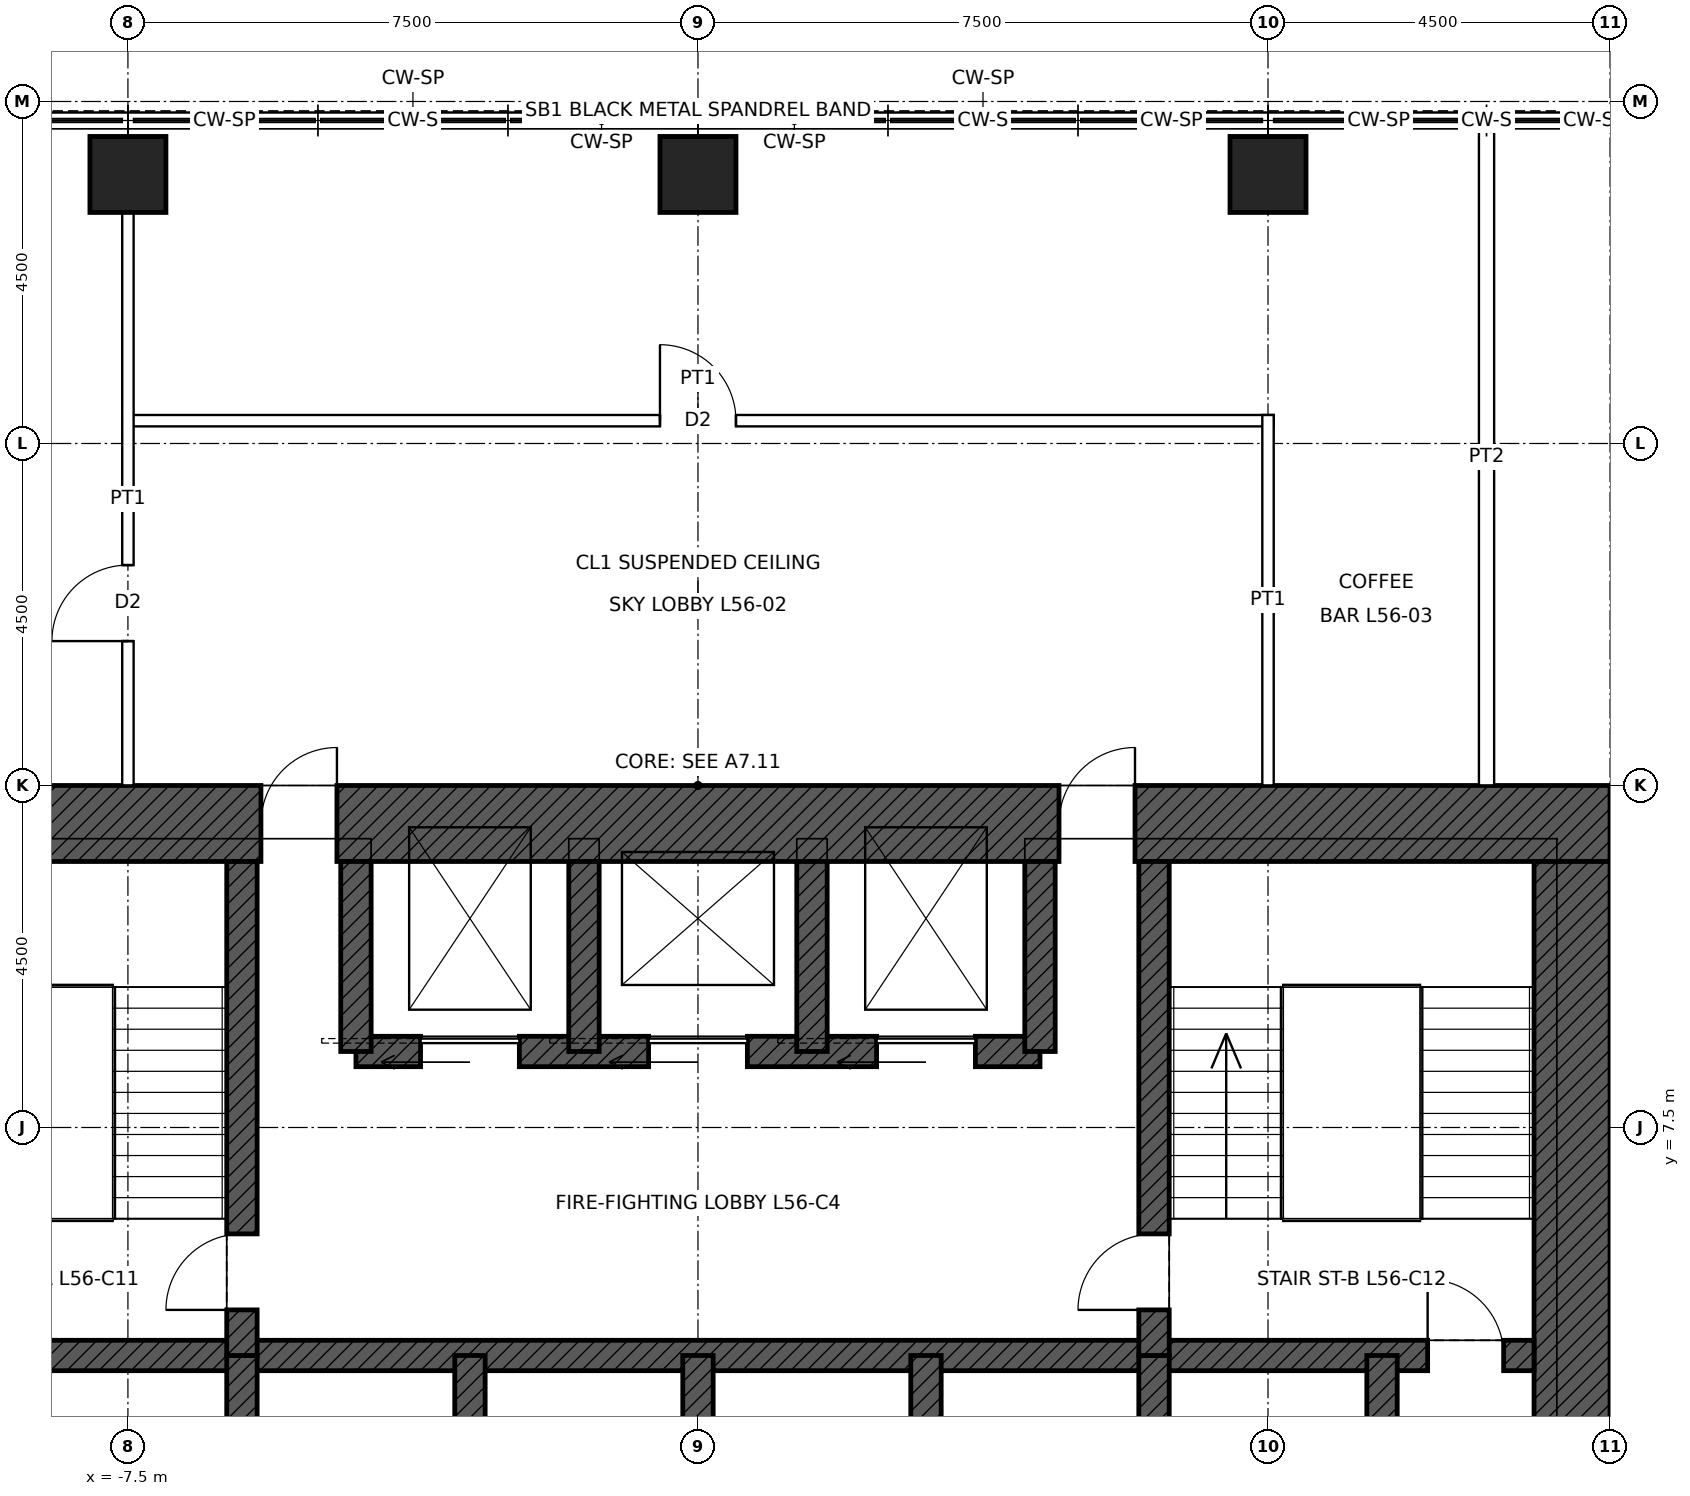
"""IFC4 building model, lengths in metres.
Left out: names, types, materials, properties, quantities, classifications, styles, units other than length and angle.
Written with IfcOpenShell. Run it as: python <this file> out.ifc"""

import sys

from ifc_helpers import new_model, si_unit, direction, frame, frame_2d, origin, origin_2d, place, context, subcontext, project, spatial, rectangle, hollow_rectangle, extrude, element, fill, save


model = new_model("IFC4")
c1 = context("Model", 3, precision=1e-05, world=origin(), true_north=direction((0.0, 1.0)))
c2 = subcontext(c1, "Body", "Model", "MODEL_VIEW")
j1 = project(units=[si_unit("LENGTHUNIT", "METRE"), si_unit("PLANEANGLEUNIT", "RADIAN")], contexts=[c1])
p1 = place(None, origin())
s1 = spatial("IfcSite", under=j1, at=p1, CompositionType="ELEMENT")
p2 = place(p1, origin())
s2 = spatial("IfcBuilding", under=s1, at=p2, CompositionType="ELEMENT")
p3 = place(p2, frame((0.0, 0.0, 259.9)))
s3 = spatial("IfcBuildingStorey", under=s2, at=p3, CompositionType="ELEMENT", Elevation=259.9)
for number, where, z_axis, x_axis in (
    (1, (-7.5, 20.04, 0.0), (0.0, 0.0, 1.0), (1.0, 0.0, 0.0)),
    (2, (0.0, 20.04, 0.0), (0.0, 0.0, 1.0), (1.0, 0.0, 0.0)),
    (3, (7.5, 20.04, 0.0), (0.0, 0.0, 1.0), (1.0, 0.0, 0.0)),
):
    element("IfcColumn", number, at=place(p3, frame(where, z_axis=z_axis, x_axis=x_axis)), inside=s3, PredefinedType="COLUMN", context=c2, shape_type="SweptSolid", body=[
        extrude(hollow_rectangle(XDim=1.0, YDim=1.0, WallThickness=0.075, at=origin_2d()), origin(), (0.0, 0.0, 1.0), 4.0),
    ])
p4 = place(p3, frame((-12.0, 11.5, 0.0), z_axis=(0.0, 0.0, 1.0), x_axis=(1.0, 0.0, 0.0)))
e4 = element("IfcWall", 4, at=p4, inside=s3, PredefinedType="SHEAR", context=c2, shape_type="SweptSolid", body=[
    extrude(rectangle(XDim=24.0, YDim=1.0, at=frame_2d((12.0, 0.0))), origin(), (0.0, 0.0, 1.0), 4.0),
])
p5 = place(p4, frame((6.25, 0.0, 0.0)))
e5 = element("IfcOpeningElement", 5, at=p5, cuts=e4, PredefinedType="OPENING", context=c2, shape_type="SweptSolid", body=[
    extrude(rectangle(XDim=1.0, YDim=2.4, at=frame_2d((0.5, 1.2))), frame((0.0, 0.51, 0.0), z_axis=(0.0, -1.0, 0.0), x_axis=(1.0, 0.0, 0.0)), (0.0, 0.0, 1.0), 1.02),
])
p6 = place(p4, frame((16.75, 0.0, 0.0)))
e6 = element("IfcOpeningElement", 6, at=p6, cuts=e4, PredefinedType="OPENING", context=c2, shape_type="SweptSolid", body=[
    extrude(rectangle(XDim=1.0, YDim=2.4, at=frame_2d((0.5, 1.2))), frame((0.0, 0.51, 0.0), z_axis=(0.0, -1.0, 0.0), x_axis=(1.0, 0.0, 0.0)), (0.0, 0.0, 1.0), 1.02),
])
p7 = place(p3, frame((11.5, 11.0, 0.0), z_axis=(0.0, 0.0, 1.0), x_axis=(0.0, -1.0, 0.0)))
e7 = element("IfcWall", 7, at=p7, inside=s3, PredefinedType="SHEAR", context=c2, shape_type="SweptSolid", body=[
    extrude(rectangle(XDim=22.0, YDim=1.0, at=frame_2d((11.0, 0.0))), origin(), (0.0, 0.0, 1.0), 4.0),
])
p8 = place(p7, frame((10.5, 0.0, 0.0)))
e8 = element("IfcOpeningElement", 8, at=p8, cuts=e7, PredefinedType="OPENING", context=c2, shape_type="SweptSolid", body=[
    extrude(rectangle(XDim=1.0, YDim=2.4, at=frame_2d((0.5, 1.2))), frame((0.0, 0.51, 0.0), z_axis=(0.0, -1.0, 0.0), x_axis=(1.0, 0.0, 0.0)), (0.0, 0.0, 1.0), 1.02),
])
p9 = place(p3, frame((-11.0, 4.5, 0.0), z_axis=(0.0, 0.0, 1.0), x_axis=(1.0, 0.0, 0.0)))
e9 = element("IfcWall", 9, at=p9, inside=s3, PredefinedType="SHEAR", context=c2, shape_type="SweptSolid", body=[
    extrude(rectangle(XDim=22.0, YDim=0.4, at=frame_2d((11.0, 0.0))), origin(), (0.0, 0.0, 1.0), 4.0),
])
p10 = place(p9, frame((0.4, 0.0, 0.0)))
e10 = element("IfcOpeningElement", 10, at=p10, cuts=e9, PredefinedType="OPENING", context=c2, shape_type="SweptSolid", body=[
    extrude(rectangle(XDim=1.0, YDim=2.1, at=frame_2d((0.5, 1.05))), frame((0.0, 0.21, 0.0), z_axis=(0.0, -1.0, 0.0), x_axis=(1.0, 0.0, 0.0)), (0.0, 0.0, 1.0), 0.42),
])
p11 = place(p9, frame((20.6, 0.0, 0.0)))
e11 = element("IfcOpeningElement", 11, at=p11, cuts=e9, PredefinedType="OPENING", context=c2, shape_type="SweptSolid", body=[
    extrude(rectangle(XDim=1.0, YDim=2.1, at=frame_2d((0.5, 1.05))), frame((0.0, 0.21, 0.0), z_axis=(0.0, -1.0, 0.0), x_axis=(1.0, 0.0, 0.0)), (0.0, 0.0, 1.0), 0.42),
])
p12 = place(p3, frame((-4.5, 8.5, 0.0), z_axis=(0.0, 0.0, 1.0), x_axis=(1.0, 0.0, 0.0)))
e12 = element("IfcWall", 12, at=p12, inside=s3, PredefinedType="SHEAR", context=c2, shape_type="SweptSolid", body=[
    extrude(rectangle(XDim=9.0, YDim=0.4, at=frame_2d((4.5, 0.0))), origin(), (0.0, 0.0, 1.0), 4.0),
])
p13 = place(p12, frame((0.85, 0.0, 0.0)))
e13 = element("IfcOpeningElement", 13, at=p13, cuts=e12, PredefinedType="OPENING", context=c2, shape_type="SweptSolid", body=[
    extrude(rectangle(XDim=1.3, YDim=2.4, at=frame_2d((0.65, 1.2))), frame((0.0, 0.21, 0.0), z_axis=(0.0, -1.0, 0.0), x_axis=(1.0, 0.0, 0.0)), (0.0, 0.0, 1.0), 0.42),
])
p14 = place(p12, frame((6.85, 0.0, 0.0)))
e14 = element("IfcOpeningElement", 14, at=p14, cuts=e12, PredefinedType="OPENING", context=c2, shape_type="SweptSolid", body=[
    extrude(rectangle(XDim=1.3, YDim=2.4, at=frame_2d((0.65, 1.2))), frame((0.0, 0.21, 0.0), z_axis=(0.0, -1.0, 0.0), x_axis=(1.0, 0.0, 0.0)), (0.0, 0.0, 1.0), 0.42),
])
p15 = place(p12, frame((3.85, 0.0, 0.0)))
e15 = element("IfcOpeningElement", 15, at=p15, cuts=e12, PredefinedType="OPENING", context=c2, shape_type="SweptSolid", body=[
    extrude(rectangle(XDim=1.3, YDim=2.4, at=frame_2d((0.65, 1.2))), frame((0.0, 0.21, 0.0), z_axis=(0.0, -1.0, 0.0), x_axis=(1.0, 0.0, 0.0)), (0.0, 0.0, 1.0), 0.42),
])
for number, where, z_axis, x_axis in (
    (16, (9.0, 1.5, 0.0), (0.0, 0.0, 1.0), (0.0, 1.0, 0.0)),
    (17, (-6.0, 1.5, 0.0), (0.0, 0.0, 1.0), (0.0, 1.0, 0.0)),
    (18, (-3.0, 1.5, 0.0), (0.0, 0.0, 1.0), (0.0, 1.0, 0.0)),
    (19, (0.0, 1.5, 0.0), (0.0, 0.0, 1.0), (0.0, 1.0, 0.0)),
    (20, (3.0, 1.5, 0.0), (0.0, 0.0, 1.0), (0.0, 1.0, 0.0)),
    (21, (6.0, 1.5, 0.0), (0.0, 0.0, 1.0), (0.0, 1.0, 0.0)),
):
    element("IfcWall", number, at=place(p3, frame(where, z_axis=z_axis, x_axis=x_axis)), inside=s3, PredefinedType="SHEAR", context=c2, shape_type="SweptSolid", body=[
        extrude(rectangle(XDim=3.0, YDim=0.4, at=frame_2d((1.5, 0.0))), origin(), (0.0, 0.0, 1.0), 4.0),
    ])
p16 = place(p3, frame((-6.0, 4.5, 0.0), z_axis=(0.0, 0.0, 1.0), x_axis=(0.0, 1.0, 0.0)))
e22 = element("IfcWall", 22, at=p16, inside=s3, PredefinedType="SHEAR", context=c2, shape_type="SweptSolid", body=[
    extrude(rectangle(XDim=6.5, YDim=0.4, at=frame_2d((3.25, 0.0))), origin(), (0.0, 0.0, 1.0), 4.0),
])
p17 = place(p16, frame((0.6, 0.0, 0.0)))
e23 = element("IfcOpeningElement", 23, at=p17, cuts=e22, PredefinedType="OPENING", context=c2, shape_type="SweptSolid", body=[
    extrude(rectangle(XDim=1.0, YDim=2.1, at=frame_2d((0.5, 1.05))), frame((0.0, 0.21, 0.0), z_axis=(0.0, -1.0, 0.0), x_axis=(1.0, 0.0, 0.0)), (0.0, 0.0, 1.0), 0.42),
])
p18 = place(p3, frame((6.0, 4.5, 0.0), z_axis=(0.0, 0.0, 1.0), x_axis=(0.0, 1.0, 0.0)))
e24 = element("IfcWall", 24, at=p18, inside=s3, PredefinedType="SHEAR", context=c2, shape_type="SweptSolid", body=[
    extrude(rectangle(XDim=6.5, YDim=0.4, at=frame_2d((3.25, 0.0))), origin(), (0.0, 0.0, 1.0), 4.0),
])
p19 = place(p18, frame((0.6, 0.0, 0.0)))
e25 = element("IfcOpeningElement", 25, at=p19, cuts=e24, PredefinedType="OPENING", context=c2, shape_type="SweptSolid", body=[
    extrude(rectangle(XDim=1.0, YDim=2.1, at=frame_2d((0.5, 1.05))), frame((0.0, 0.21, 0.0), z_axis=(0.0, -1.0, 0.0), x_axis=(1.0, 0.0, 0.0)), (0.0, 0.0, 1.0), 0.42),
])
for number, where, z_axis, x_axis in (
    (26, (-4.5, 8.5, 0.0), (0.0, 0.0, 1.0), (0.0, 1.0, 0.0)),
    (27, (4.5, 8.5, 0.0), (0.0, 0.0, 1.0), (0.0, 1.0, 0.0)),
    (28, (-1.5, 8.5, 0.0), (0.0, 0.0, 1.0), (0.0, 1.0, 0.0)),
    (29, (1.5, 8.5, 0.0), (0.0, 0.0, 1.0), (0.0, 1.0, 0.0)),
):
    element("IfcWall", number, at=place(p3, frame(where, z_axis=z_axis, x_axis=x_axis)), inside=s3, PredefinedType="SHEAR", context=c2, shape_type="SweptSolid", body=[
        extrude(rectangle(XDim=2.5, YDim=0.4, at=frame_2d((1.25, 0.0))), origin(), (0.0, 0.0, 1.0), 4.0),
    ])
p20 = place(p3, frame((-7.575, 16.8, 0.0), z_axis=(0.0, 0.0, 1.0), x_axis=(1.0, 0.0, 0.0)))
e30 = element("IfcWall", 30, at=p20, inside=s3, PredefinedType="PARTITIONING", context=c2, shape_type="SweptSolid", body=[
    extrude(rectangle(XDim=15.15, YDim=0.15, at=frame_2d((7.575, 0.0))), origin(), (0.0, 0.0, 1.0), 3.85),
])
p21 = place(p20, frame((7.075, 0.0, 0.0)))
e31 = element("IfcOpeningElement", 31, at=p21, cuts=e30, PredefinedType="OPENING", context=c2, shape_type="SweptSolid", body=[
    extrude(rectangle(XDim=1.0, YDim=2.1, at=frame_2d((0.5, 1.05))), frame((0.0, 0.085, 0.0), z_axis=(0.0, -1.0, 0.0), x_axis=(1.0, 0.0, 0.0)), (0.0, 0.0, 1.0), 0.17),
])
p22 = place(p3, frame((-7.5, 12.0, 0.0), z_axis=(0.0, 0.0, 1.0), x_axis=(0.0, 1.0, 0.0)))
e32 = element("IfcWall", 32, at=p22, inside=s3, PredefinedType="PARTITIONING", context=c2, shape_type="SweptSolid", body=[
    extrude(rectangle(XDim=7.54, YDim=0.15, at=frame_2d((3.77, 0.0))), origin(), (0.0, 0.0, 1.0), 3.243),
])
p23 = place(p22, frame((1.9, 0.0, 0.0)))
e33 = element("IfcOpeningElement", 33, at=p23, cuts=e32, PredefinedType="OPENING", context=c2, shape_type="SweptSolid", body=[
    extrude(rectangle(XDim=1.0, YDim=2.1, at=frame_2d((0.5, 1.05))), frame((0.0, 0.085, 0.0), z_axis=(0.0, -1.0, 0.0), x_axis=(1.0, 0.0, 0.0)), (0.0, 0.0, 1.0), 0.17),
])
p24 = place(p3, frame((7.5, 12.0, 0.0), z_axis=(0.0, 0.0, 1.0), x_axis=(0.0, 1.0, 0.0)))
e34 = element("IfcWall", 34, at=p24, inside=s3, PredefinedType="PARTITIONING", context=c2, shape_type="SweptSolid", body=[
    extrude(rectangle(XDim=4.875, YDim=0.15, at=frame_2d((2.438, 0.0))), origin(), (0.0, 0.0, 1.0), 3.243),
])
p25 = place(p3, frame((10.375, 12.0, 0.0), z_axis=(0.0, 0.0, 1.0), x_axis=(0.0, 1.0, 0.0)))
e35 = element("IfcWall", 35, at=p25, inside=s3, PredefinedType="PARTITIONING", context=c2, shape_type="SweptSolid", body=[
    extrude(rectangle(XDim=8.65, YDim=0.2, at=frame_2d((4.325, 0.0))), origin(), (0.0, 0.0, 1.0), 3.85),
])
p26 = place(p11, origin())
e36 = element("IfcDoor", 36, at=p26, inside=s3, OperationType="SINGLE_SWING_LEFT", PredefinedType="DOOR", context=c2, shape_type="SweptSolid", body=[
    extrude(rectangle(XDim=1.0, YDim=2.1, at=frame_2d((0.5, 1.05))), frame((0.0, 0.025, 0.0), z_axis=(0.0, -1.0, 0.0), x_axis=(1.0, 0.0, 0.0)), (0.0, 0.0, 1.0), 0.05),
])
fill(e11, e36)
p27 = place(p17, origin())
e37 = element("IfcDoor", 37, at=p27, inside=s3, OperationType="SINGLE_SWING_LEFT", PredefinedType="DOOR", context=c2, shape_type="SweptSolid", body=[
    extrude(rectangle(XDim=1.0, YDim=2.1, at=frame_2d((0.5, 1.05))), frame((0.0, 0.025, 0.0), z_axis=(0.0, -1.0, 0.0), x_axis=(1.0, 0.0, 0.0)), (0.0, 0.0, 1.0), 0.05),
])
fill(e23, e37)
p28 = place(p19, origin())
e38 = element("IfcDoor", 38, at=p28, inside=s3, OperationType="SINGLE_SWING_LEFT", PredefinedType="DOOR", context=c2, shape_type="SweptSolid", body=[
    extrude(rectangle(XDim=1.0, YDim=2.1, at=frame_2d((0.5, 1.05))), frame((0.0, 0.025, 0.0), z_axis=(0.0, -1.0, 0.0), x_axis=(1.0, 0.0, 0.0)), (0.0, 0.0, 1.0), 0.05),
])
fill(e25, e38)
p29 = place(p5, origin())
e39 = element("IfcDoor", 39, at=p29, inside=s3, OperationType="SINGLE_SWING_RIGHT", PredefinedType="DOOR", context=c2, shape_type="SweptSolid", body=[
    extrude(rectangle(XDim=1.0, YDim=2.4, at=frame_2d((0.5, 1.2))), frame((0.0, 0.485, 0.0), z_axis=(0.0, -1.0, 0.0), x_axis=(1.0, 0.0, 0.0)), (0.0, 0.0, 1.0), 0.05),
])
fill(e5, e39)
p30 = place(p6, origin())
e40 = element("IfcDoor", 40, at=p30, inside=s3, OperationType="SINGLE_SWING_RIGHT", PredefinedType="DOOR", context=c2, shape_type="SweptSolid", body=[
    extrude(rectangle(XDim=1.0, YDim=2.4, at=frame_2d((0.5, 1.2))), frame((0.0, 0.485, 0.0), z_axis=(0.0, -1.0, 0.0), x_axis=(1.0, 0.0, 0.0)), (0.0, 0.0, 1.0), 0.05),
])
fill(e6, e40)
p31 = place(p13, origin())
e41 = element("IfcDoor", 41, at=p31, inside=s3, OperationType="SLIDING_TO_LEFT", PredefinedType="DOOR", context=c2, shape_type="SweptSolid", body=[
    extrude(rectangle(XDim=1.3, YDim=2.4, at=frame_2d((0.65, 1.2))), frame((0.0, 0.025, 0.0), z_axis=(0.0, -1.0, 0.0), x_axis=(1.0, 0.0, 0.0)), (0.0, 0.0, 1.0), 0.05),
])
fill(e13, e41)
p32 = place(p14, origin())
e42 = element("IfcDoor", 42, at=p32, inside=s3, OperationType="SLIDING_TO_LEFT", PredefinedType="DOOR", context=c2, shape_type="SweptSolid", body=[
    extrude(rectangle(XDim=1.3, YDim=2.4, at=frame_2d((0.65, 1.2))), frame((0.0, 0.025, 0.0), z_axis=(0.0, -1.0, 0.0), x_axis=(1.0, 0.0, 0.0)), (0.0, 0.0, 1.0), 0.05),
])
fill(e14, e42)
p33 = place(p15, origin())
e43 = element("IfcDoor", 43, at=p33, inside=s3, OperationType="SLIDING_TO_LEFT", PredefinedType="DOOR", context=c2, shape_type="SweptSolid", body=[
    extrude(rectangle(XDim=1.3, YDim=2.4, at=frame_2d((0.65, 1.2))), frame((0.0, 0.025, 0.0), z_axis=(0.0, -1.0, 0.0), x_axis=(1.0, 0.0, 0.0)), (0.0, 0.0, 1.0), 0.05),
])
fill(e15, e43)
p34 = place(p21, origin())
e44 = element("IfcDoor", 44, at=p34, inside=s3, OperationType="SINGLE_SWING_LEFT", PredefinedType="DOOR", context=c2, shape_type="SweptSolid", body=[
    extrude(rectangle(XDim=1.0, YDim=2.1, at=frame_2d((0.5, 1.05))), frame((0.0, 0.025, 0.0), z_axis=(0.0, -1.0, 0.0), x_axis=(1.0, 0.0, 0.0)), (0.0, 0.0, 1.0), 0.05),
])
fill(e31, e44)
p35 = place(p23, origin())
e45 = element("IfcDoor", 45, at=p35, inside=s3, OperationType="SINGLE_SWING_LEFT", PredefinedType="DOOR", context=c2, shape_type="SweptSolid", body=[
    extrude(rectangle(XDim=1.0, YDim=2.1, at=frame_2d((0.5, 1.05))), frame((0.0, 0.025, 0.0), z_axis=(0.0, -1.0, 0.0), x_axis=(1.0, 0.0, 0.0)), (0.0, 0.0, 1.0), 0.05),
])
fill(e33, e45)
save(model, sys.argv[1])
